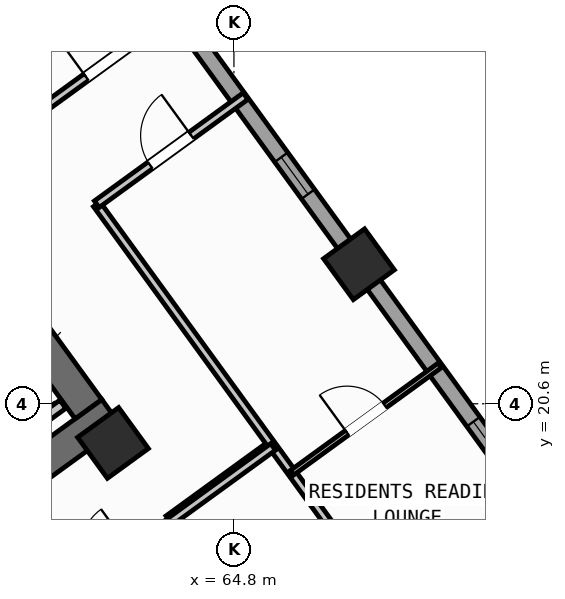
"""IFC4 building model, lengths in metres.
Left out: names, types, materials, properties, quantities, classifications, styles, units other than length and angle.
Written with IfcOpenShell. Run it as: python <this file> out.ifc"""

import sys

from ifc_helpers import new_model, si_unit, direction, frame, frame_2d, origin, origin_2d, place, context, subcontext, project, spatial, rectangle, hollow_rectangle, extrude, source, transform, mapped, element, fill, save


model = new_model("IFC4")
c1 = context("Model", 3, precision=1e-05, world=origin(), true_north=direction((0.0, 1.0)))
c2 = subcontext(c1, "Body", "Model", "MODEL_VIEW")
j1 = project(units=[si_unit("LENGTHUNIT", "METRE"), si_unit("PLANEANGLEUNIT", "RADIAN")], contexts=[c1])
p1 = place(None, origin())
s1 = spatial("IfcSite", under=j1, at=p1, CompositionType="ELEMENT")
p2 = place(p1, origin())
s2 = spatial("IfcBuilding", under=s1, at=p2, CompositionType="ELEMENT")
p3 = place(p2, frame((0.0, 0.0, 67.2)))
s3 = spatial("IfcBuildingStorey", under=s2, at=p3, CompositionType="ELEMENT", Elevation=67.2)
p4 = place(p3, frame((52.318, 13.11, 0.0), z_axis=(0.0, 0.0, 1.0), x_axis=(0.809019445368, 0.587781878776, 0.0)))
e1 = element("IfcWall", 1, at=p4, inside=s3, PredefinedType="SHEAR", context=c2, shape_type="SweptSolid", body=[
    extrude(rectangle(XDim=12.44, YDim=0.65, at=frame_2d((6.22, 0.0))), origin(), (0.0, 0.0, 1.0), 4.22),
])
p5 = place(p3, frame((61.929, 20.494, 0.0), z_axis=(0.0, 0.0, 1.0), x_axis=(-0.58782982593, 0.808984607855, 0.0)))
e2 = element("IfcWall", 2, at=p5, inside=s3, PredefinedType="SHEAR", context=c2, shape_type="SweptSolid", body=[
    extrude(rectangle(XDim=3.525, YDim=0.65, at=frame_2d((1.762, 0.0))), origin(), (0.0, 0.0, 1.0), 4.22),
])
m1 = source(origin(), c2, "Body", "SweptSolid", [
    extrude(hollow_rectangle(XDim=1.0, YDim=1.0, WallThickness=0.04, at=origin_2d()), origin(), (0.0, 0.0, 1.0), 4.5),
])
for number, where, z_axis, x_axis in (
    (3, (62.414, 19.827, 0.0), (0.0, 0.0, 1.0), (0.809, 0.588, 0.0)),
    (4, (67.268, 23.354, 0.0), (0.0, 0.0, 1.0), (0.809, 0.588, 0.0)),
):
    element("IfcColumn", number, at=place(p3, frame(where, z_axis=z_axis, x_axis=x_axis)), inside=s3, PredefinedType="COLUMN", context=c2, shape_type="MappedRepresentation", body=[
        mapped(m1, transform((0.0, 0.0, 0.0), scale=1.0)),
    ])
p6 = place(p3, frame((58.455, 35.484, 0.0), z_axis=(0.0, 0.0, 1.0), x_axis=(0.587783625747, -0.809018176127, 0.0)))
e5 = element("IfcWall", 5, at=p6, inside=s3, PredefinedType="STANDARD", context=c2, shape_type="SweptSolid", body=[
    extrude(rectangle(XDim=21.587, YDim=0.32, at=frame_2d((10.794, 0.0))), origin(), (0.0, 0.0, 1.0), 2.395),
])
p7 = place(p6, frame((2.194, 0.0, 1.0)))
e6 = element("IfcOpeningElement", 6, at=p7, cuts=e5, PredefinedType="OPENING", context=c2, shape_type="SweptSolid", body=[
    extrude(rectangle(XDim=0.9, YDim=1.25, at=frame_2d((0.45, 0.625))), frame((0.0, 0.17, 0.0), z_axis=(0.0, -1.0, 0.0), x_axis=(1.0, 0.0, 0.0)), (0.0, 0.0, 1.0), 0.34),
])
p8 = place(p6, frame((4.994, 0.0, 1.0)))
e7 = element("IfcOpeningElement", 7, at=p8, cuts=e5, PredefinedType="OPENING", context=c2, shape_type="SweptSolid", body=[
    extrude(rectangle(XDim=0.9, YDim=1.25, at=frame_2d((0.45, 0.625))), frame((0.0, 0.17, 0.0), z_axis=(0.0, -1.0, 0.0), x_axis=(1.0, 0.0, 0.0)), (0.0, 0.0, 1.0), 0.34),
])
p9 = place(p6, frame((12.384, 0.0, 1.0)))
e8 = element("IfcOpeningElement", 8, at=p9, cuts=e5, PredefinedType="OPENING", context=c2, shape_type="SweptSolid", body=[
    extrude(rectangle(XDim=0.9, YDim=1.25, at=frame_2d((0.45, 0.625))), frame((0.0, 0.17, 0.0), z_axis=(0.0, -1.0, 0.0), x_axis=(1.0, 0.0, 0.0)), (0.0, 0.0, 1.0), 0.34),
])
p10 = place(p6, frame((18.835, 0.0, 1.0)))
e9 = element("IfcOpeningElement", 9, at=p10, cuts=e5, PredefinedType="OPENING", context=c2, shape_type="SweptSolid", body=[
    extrude(rectangle(XDim=0.9, YDim=1.25, at=frame_2d((0.45, 0.625))), frame((0.0, 0.17, 0.0), z_axis=(0.0, -1.0, 0.0), x_axis=(1.0, 0.0, 0.0)), (0.0, 0.0, 1.0), 0.34),
])
p11 = place(p3, frame((58.472, 18.447, 0.0), z_axis=(0.0, 0.0, 1.0), x_axis=(0.809022487728, 0.587777691266, 0.0)))
e10 = element("IfcWall", 10, at=p11, inside=s3, PredefinedType="STANDARD", context=c2, shape_type="SweptSolid", body=[
    extrude(rectangle(XDim=3.648, YDim=0.2, at=frame_2d((1.824, 0.0))), origin(), (0.0, 0.0, 1.0), 4.21),
])
p12 = place(p3, frame((63.507, 18.322, 0.0), z_axis=(0.0, 0.0, 1.0), x_axis=(0.809034604122, 0.587761013791, 0.0)))
e11 = element("IfcWall", 11, at=p12, inside=s3, PredefinedType="PARTITIONING", context=c2, shape_type="SweptSolid", body=[
    extrude(rectangle(XDim=2.51, YDim=0.16, at=frame_2d((1.255, 0.0))), origin(), (0.0, 0.0, 1.0), 4.21),
])
p13 = place(p3, frame((68.353, 15.922, 0.0), z_axis=(0.0, 0.0, 1.0), x_axis=(-0.587783168305, 0.809018508476, 0.0)))
e12 = element("IfcWall", 12, at=p13, inside=s3, PredefinedType="PARTITIONING", context=c2, shape_type="SweptSolid", body=[
    extrude(rectangle(XDim=10.65, YDim=0.16, at=frame_2d((5.325, 0.0))), origin(), (0.0, 0.0, 1.0), 4.21),
])
p14 = place(p3, frame((62.093, 24.538, 0.0), z_axis=(0.0, 0.0, 1.0), x_axis=(0.809035546126, 0.58775971715, 0.0)))
e13 = element("IfcWall", 13, at=p14, inside=s3, PredefinedType="PARTITIONING", context=c2, shape_type="SweptSolid", body=[
    extrude(rectangle(XDim=3.63, YDim=0.16, at=frame_2d((1.815, 0.0))), origin(), (0.0, 0.0, 1.0), 4.21),
])
p15 = place(p14, frame((1.305, 0.0, 0.0)))
e14 = element("IfcOpeningElement", 14, at=p15, cuts=e13, PredefinedType="OPENING", context=c2, shape_type="SweptSolid", body=[
    extrude(rectangle(XDim=1.0, YDim=2.1, at=frame_2d((0.5, 1.05))), frame((0.0, 0.09, 0.0), z_axis=(0.0, -1.0, 0.0), x_axis=(1.0, 0.0, 0.0)), (0.0, 0.0, 1.0), 0.18),
])
p16 = place(p3, frame((60.829, 26.278, 0.0), z_axis=(0.0, 0.0, 1.0), x_axis=(0.809003564202, 0.587803736896, 0.0)))
e15 = element("IfcWall", 15, at=p16, inside=s3, PredefinedType="PARTITIONING", context=c2, shape_type="SweptSolid", body=[
    extrude(rectangle(XDim=3.63, YDim=0.16, at=frame_2d((1.815, 0.0))), origin(), (0.0, 0.0, 1.0), 4.21),
])
p17 = place(p16, frame((1.305, 0.0, 0.0)))
e16 = element("IfcOpeningElement", 16, at=p17, cuts=e15, PredefinedType="OPENING", context=c2, shape_type="SweptSolid", body=[
    extrude(rectangle(XDim=1.0, YDim=2.1, at=frame_2d((0.5, 1.05))), frame((0.0, 0.09, 0.0), z_axis=(0.0, -1.0, 0.0), x_axis=(1.0, 0.0, 0.0)), (0.0, 0.0, 1.0), 0.18),
])
p18 = place(p3, frame((65.944, 19.238, 0.0), z_axis=(0.0, 0.0, 1.0), x_axis=(0.809013833588, 0.587789602718, 0.0)))
e17 = element("IfcWall", 17, at=p18, inside=s3, PredefinedType="PARTITIONING", context=c2, shape_type="SweptSolid", body=[
    extrude(rectangle(XDim=3.61, YDim=0.11, at=frame_2d((1.805, 0.0))), origin(), (0.0, 0.0, 1.0), 4.21),
])
p19 = place(p18, frame((1.345, 0.0, 0.0)))
e18 = element("IfcOpeningElement", 18, at=p19, cuts=e17, PredefinedType="OPENING", context=c2, shape_type="SweptSolid", body=[
    extrude(rectangle(XDim=0.92, YDim=2.08, at=frame_2d((0.46, 1.04))), frame((0.0, 0.065, 0.0), z_axis=(0.0, -1.0, 0.0), x_axis=(1.0, 0.0, 0.0)), (0.0, 0.0, 1.0), 0.13),
])
p20 = place(p3, frame((53.705, 11.126, 0.0), z_axis=(0.0, 0.0, 1.0), x_axis=(0.809014504436, 0.587788679384, 0.0)))
e19 = element("IfcWall", 19, at=p20, inside=s3, PredefinedType="PARTITIONING", context=c2, shape_type="SweptSolid", body=[
    extrude(rectangle(XDim=14.67, YDim=0.16, at=frame_2d((7.335, 0.0))), origin(), (0.0, 0.0, 1.0), 4.21),
])
p21 = place(p20, frame((10.2, 0.0, 0.0)))
e20 = element("IfcOpeningElement", 20, at=p21, cuts=e19, PredefinedType="OPENING", context=c2, shape_type="SweptSolid", body=[
    extrude(rectangle(XDim=1.0, YDim=2.1, at=frame_2d((0.5, 1.05))), frame((0.0, 0.09, 0.0), z_axis=(0.0, -1.0, 0.0), x_axis=(1.0, 0.0, 0.0)), (0.0, 0.0, 1.0), 0.18),
])
m2 = source(origin(), c2, "Body", "SweptSolid", [
    extrude(rectangle(XDim=0.9, YDim=1.25, at=frame_2d((0.45, 0.625))), frame((0.0, 0.03, 0.0), z_axis=(0.0, -1.0, 0.0), x_axis=(1.0, 0.0, 0.0)), (0.0, 0.0, 1.0), 0.06),
])
p22 = place(p9, origin())
e21 = element("IfcWindow", 21, at=p22, inside=s3, PartitioningType="SINGLE_PANEL", PredefinedType="WINDOW", context=c2, shape_type="MappedRepresentation", body=[
    mapped(m2, transform((0.0, 0.0, 0.0), scale=1.0)),
])
fill(e8, e21)
p23 = place(p10, origin())
e22 = element("IfcWindow", 22, at=p23, inside=s3, PartitioningType="SINGLE_PANEL", PredefinedType="WINDOW", context=c2, shape_type="MappedRepresentation", body=[
    mapped(m2, transform((0.0, 0.0, 0.0), scale=1.0)),
])
fill(e9, e22)
m3 = source(origin(), c2, "Body", "SweptSolid", [
    extrude(rectangle(XDim=1.0, YDim=2.1, at=frame_2d((0.5, 1.05))), frame((0.0, 0.025, 0.0), z_axis=(0.0, -1.0, 0.0), x_axis=(1.0, 0.0, 0.0)), (0.0, 0.0, 1.0), 0.05),
])
p24 = place(p17, origin())
e23 = element("IfcDoor", 23, at=p24, inside=s3, OperationType="SINGLE_SWING_LEFT", PredefinedType="DOOR", context=c2, shape_type="MappedRepresentation", body=[
    mapped(m3, transform((0.0, 0.0, 0.0), scale=1.0)),
])
fill(e16, e23)
p25 = place(p15, origin())
e24 = element("IfcDoor", 24, at=p25, inside=s3, OperationType="SINGLE_SWING_RIGHT", PredefinedType="DOOR", context=c2, shape_type="MappedRepresentation", body=[
    mapped(m3, transform((0.0, 0.0, 0.0), scale=1.0)),
])
fill(e14, e24)
m4 = source(origin(), c2, "Body", "SweptSolid", [
    extrude(rectangle(XDim=0.92, YDim=2.08, at=frame_2d((0.46, 1.04))), frame((0.0, 0.025, 0.0), z_axis=(0.0, -1.0, 0.0), x_axis=(1.0, 0.0, 0.0)), (0.0, 0.0, 1.0), 0.05),
])
p26 = place(p19, origin())
e25 = element("IfcDoor", 25, at=p26, inside=s3, OperationType="SINGLE_SWING_LEFT", PredefinedType="DOOR", context=c2, shape_type="MappedRepresentation", body=[
    mapped(m4, transform((0.0, 0.0, 0.0), scale=1.0)),
])
fill(e18, e25)
save(model, sys.argv[1])
